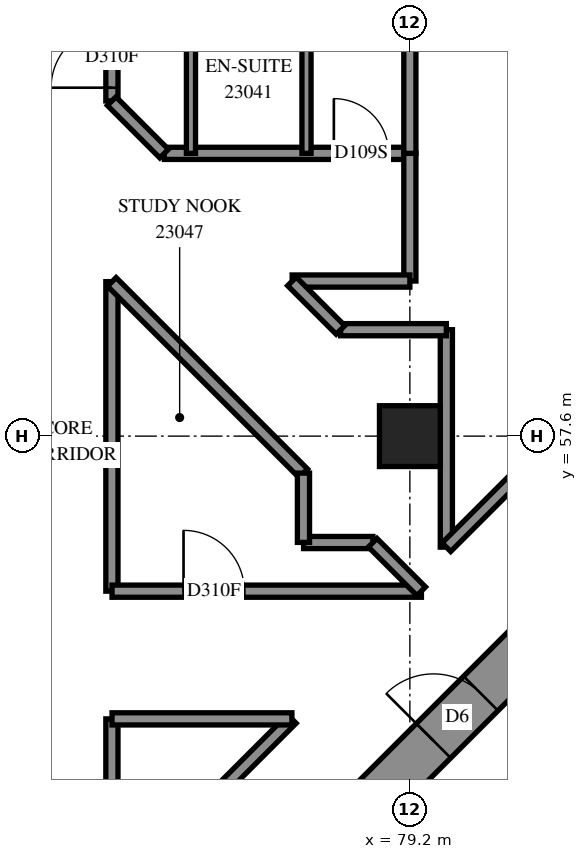
"""IFC4 building model, lengths in metres.
Left out: names, types, materials, properties, quantities, classifications, styles, units other than length and angle.
Written with IfcOpenShell. Run it as: python <this file> out.ifc"""

import sys

from ifc_helpers import new_model, si_unit, direction, frame, frame_2d, origin, origin_2d, place, context, subcontext, project, spatial, rectangle, extrude, element, fill, save


model = new_model("IFC4")
c1 = context("Model", 3, precision=1e-05, world=origin(), true_north=direction((0.0, 1.0)))
c2 = subcontext(c1, "Body", "Model", "MODEL_VIEW")
j1 = project(units=[si_unit("LENGTHUNIT", "METRE"), si_unit("PLANEANGLEUNIT", "RADIAN")], contexts=[c1])
p1 = place(None, origin())
s1 = spatial("IfcSite", under=j1, at=p1, CompositionType="ELEMENT")
p2 = place(p1, origin())
s2 = spatial("IfcBuilding", under=s1, at=p2, CompositionType="ELEMENT")
p3 = place(p2, frame((0.0, 0.0, 88.0)))
s3 = spatial("IfcBuildingStorey", under=s2, at=p3, CompositionType="ELEMENT", Elevation=88.0)
p4 = place(p3, frame((79.2, 57.6, 0.0), z_axis=(0.0, 0.0, 1.0), x_axis=(1.0, 0.0, 0.0)))
e1 = element("IfcColumn", 1, at=p4, inside=s3, PredefinedType="COLUMN", context=c2, shape_type="SweptSolid", body=[
    extrude(rectangle(XDim=1.0, YDim=1.0, at=origin_2d()), origin(), (0.0, 0.0, 1.0), 3.1),
])
p5 = place(p3, frame((76.372, 49.373, -0.3), z_axis=(0.0, 0.0, 1.0), x_axis=(0.7071067812, 0.7071067812, 0.0)))
e2 = element("IfcWall", 2, at=p5, inside=s3, PredefinedType="SHEAR", context=c2, shape_type="SweptSolid", body=[
    extrude(rectangle(XDim=14.4, YDim=0.8, at=frame_2d((7.2, 0.0))), origin(), (0.0, 0.0, 1.0), 2.7),
])
p6 = place(p5, frame((4.55, 0.0, 0.3)))
e3 = element("IfcOpeningElement", 3, at=p6, cuts=e2, PredefinedType="OPENING", context=c2, shape_type="SweptSolid", body=[
    extrude(rectangle(XDim=1.1, YDim=2.1, at=frame_2d((0.55, 1.05))), frame((0.0, 0.41, 0.0), z_axis=(0.0, -1.0, 0.0), x_axis=(1.0, 0.0, 0.0)), (0.0, 0.0, 1.0), 0.82),
])
p7 = place(p5, frame((11.35, 0.0, 0.3)))
e4 = element("IfcOpeningElement", 4, at=p7, cuts=e2, PredefinedType="OPENING", context=c2, shape_type="SweptSolid", body=[
    extrude(rectangle(XDim=1.1, YDim=2.1, at=frame_2d((0.55, 1.05))), frame((0.0, 0.41, 0.0), z_axis=(0.0, -1.0, 0.0), x_axis=(1.0, 0.0, 0.0)), (0.0, 0.0, 1.0), 0.82),
])
p8 = place(p3, frame((74.3, 55.05, 0.0), z_axis=(0.0, 0.0, 1.0), x_axis=(0.0, 1.0, 0.0)))
e5 = element("IfcWall", 5, at=p8, inside=s3, PredefinedType="PARTITIONING", context=c2, shape_type="SweptSolid", body=[
    extrude(rectangle(XDim=5.09, YDim=0.2, at=frame_2d((2.545, 0.0))), origin(), (0.0, 0.0, 1.0), 3.1),
])
p9 = place(p3, frame((74.302, 55.05, 0.0), z_axis=(0.0, 0.0, 1.0), x_axis=(1.0, 0.0, 0.0)))
e6 = element("IfcWall", 6, at=p9, inside=s3, PredefinedType="PARTITIONING", context=c2, shape_type="SweptSolid", body=[
    extrude(rectangle(XDim=5.088, YDim=0.2, at=frame_2d((2.544, 0.0))), origin(), (0.0, 0.0, 1.0), 3.1),
])
p10 = place(p9, frame((1.176, 0.0, 0.0)))
e7 = element("IfcOpeningElement", 7, at=p10, cuts=e6, PredefinedType="OPENING", context=c2, shape_type="SweptSolid", body=[
    extrude(rectangle(XDim=1.0, YDim=2.1, at=frame_2d((0.5, 1.05))), frame((0.0, 0.11, 0.0), z_axis=(0.0, -1.0, 0.0), x_axis=(1.0, 0.0, 0.0)), (0.0, 0.0, 1.0), 0.22),
])
p11 = place(p3, frame((74.299, 60.137, 0.0), z_axis=(0.0, 0.0, 1.0), x_axis=(0.7071067812, -0.7071067812, 0.0)))
e8 = element("IfcWall", 8, at=p11, inside=s3, PredefinedType="PARTITIONING", context=c2, shape_type="SweptSolid", body=[
    extrude(rectangle(XDim=4.452, YDim=0.2, at=frame_2d((2.226, 0.0))), origin(), (0.0, 0.0, 1.0), 3.1),
])
p12 = place(p3, frame((74.301, 49.991, 0.0), z_axis=(0.0, 0.0, 1.0), x_axis=(0.7071067812, 0.7071067812, 0.0)))
e9 = element("IfcWall", 9, at=p12, inside=s3, PredefinedType="PARTITIONING", context=c2, shape_type="SweptSolid", body=[
    extrude(rectangle(XDim=4.183, YDim=0.2, at=frame_2d((2.092, 0.0))), origin(), (0.0, 0.0, 1.0), 3.1),
])
p13 = place(p3, frame((75.162, 62.25, 0.0), z_axis=(0.0, 0.0, 1.0), x_axis=(1.0, 0.0, 0.0)))
e10 = element("IfcWall", 10, at=p13, inside=s3, PredefinedType="PARTITIONING", context=c2, shape_type="SweptSolid", body=[
    extrude(rectangle(XDim=4.038, YDim=0.2, at=frame_2d((2.019, 0.0))), origin(), (0.0, 0.0, 1.0), 3.1),
])
p14 = place(p13, frame((2.788, 0.0, 0.0)))
e11 = element("IfcOpeningElement", 11, at=p14, cuts=e10, PredefinedType="OPENING", context=c2, shape_type="SweptSolid", body=[
    extrude(rectangle(XDim=0.9, YDim=2.1, at=frame_2d((0.45, 1.05))), frame((0.0, 0.11, 0.0), z_axis=(0.0, -1.0, 0.0), x_axis=(1.0, 0.0, 0.0)), (0.0, 0.0, 1.0), 0.22),
])
p15 = place(p3, frame((74.3, 63.112, 0.0), z_axis=(0.0, 0.0, 1.0), x_axis=(0.0, 1.0, 0.0)))
e12 = element("IfcWall", 12, at=p15, inside=s3, PredefinedType="PARTITIONING", context=c2, shape_type="SweptSolid", body=[
    extrude(rectangle(XDim=3.988, YDim=0.2, at=frame_2d((1.994, 0.0))), origin(), (0.0, 0.0, 1.0), 3.1),
])
p16 = place(p15, frame((0.217, 0.0, 0.0)))
e13 = element("IfcOpeningElement", 13, at=p16, cuts=e12, PredefinedType="OPENING", context=c2, shape_type="SweptSolid", body=[
    extrude(rectangle(XDim=1.0, YDim=2.1, at=frame_2d((0.5, 1.05))), frame((0.0, 0.11, 0.0), z_axis=(0.0, -1.0, 0.0), x_axis=(1.0, 0.0, 0.0)), (0.0, 0.0, 1.0), 0.22),
])
p17 = place(p3, frame((79.8, 55.774, 0.0), z_axis=(0.0, 0.0, 1.0), x_axis=(0.0, 1.0, 0.0)))
e14 = element("IfcWall", 14, at=p17, inside=s3, PredefinedType="PARTITIONING", context=c2, shape_type="SweptSolid", body=[
    extrude(rectangle(XDim=3.576, YDim=0.2, at=frame_2d((1.788, 0.0))), origin(), (0.0, 0.0, 1.0), 3.1),
])
p18 = place(p3, frame((74.3, 49.99, 0.0), z_axis=(0.0, 0.0, 1.0), x_axis=(0.0, 1.0, 0.0)))
e15 = element("IfcWall", 15, at=p18, inside=s3, PredefinedType="PARTITIONING", context=c2, shape_type="SweptSolid", body=[
    extrude(rectangle(XDim=2.96, YDim=0.2, at=frame_2d((1.48, 0.0))), origin(), (0.0, 0.0, 1.0), 3.1),
])
p19 = place(p3, frame((74.302, 52.95, 0.0), z_axis=(0.0, 0.0, 1.0), x_axis=(1.0, 0.0, 0.0)))
e16 = element("IfcWall", 16, at=p19, inside=s3, PredefinedType="PARTITIONING", context=c2, shape_type="SweptSolid", body=[
    extrude(rectangle(XDim=2.958, YDim=0.2, at=frame_2d((1.479, 0.0))), origin(), (0.0, 0.0, 1.0), 3.1),
])
for number, where, z_axis, x_axis in (
    (17, (75.6, 62.25, 0.0), (0.0, 0.0, 1.0), (0.0, 1.0, 0.0)),
    (18, (77.5, 62.25, 0.0), (0.0, 0.0, 1.0), (0.0, 1.0, 0.0)),
):
    element("IfcWall", number, at=place(p3, frame(where, z_axis=z_axis, x_axis=x_axis)), inside=s3, PredefinedType="PARTITIONING", context=c2, shape_type="SweptSolid", body=[
        extrude(rectangle(XDim=2.4, YDim=0.15, at=frame_2d((1.2, 0.0))), origin(), (0.0, 0.0, 1.0), 3.1),
    ])
p20 = place(p3, frame((79.2, 60.15, 0.0), z_axis=(0.0, 0.0, 1.0), x_axis=(0.0, 1.0, 0.0)))
e19 = element("IfcWall", 19, at=p20, inside=s3, PredefinedType="PARTITIONING", context=c2, shape_type="SweptSolid", body=[
    extrude(rectangle(XDim=2.1, YDim=0.2, at=frame_2d((1.05, 0.0))), origin(), (0.0, 0.0, 1.0), 3.1),
])
p21 = place(p3, frame((79.2, 62.25, 0.0), z_axis=(0.0, 0.0, 1.0), x_axis=(0.0, 1.0, 0.0)))
e20 = element("IfcWall", 20, at=p21, inside=s3, PredefinedType="PARTITIONING", context=c2, shape_type="SweptSolid", body=[
    extrude(rectangle(XDim=2.05, YDim=0.2, at=frame_2d((1.025, 0.0))), origin(), (0.0, 0.0, 1.0), 3.1),
])
p22 = place(p3, frame((77.264, 60.15, 0.0), z_axis=(0.0, 0.0, 1.0), x_axis=(1.0, 0.0, 0.0)))
e21 = element("IfcWall", 21, at=p22, inside=s3, PredefinedType="PARTITIONING", context=c2, shape_type="SweptSolid", body=[
    extrude(rectangle(XDim=1.936, YDim=0.2, at=frame_2d((0.968, 0.0))), origin(), (0.0, 0.0, 1.0), 3.1),
])
p23 = place(p3, frame((78.062, 59.35, 0.0), z_axis=(0.0, 0.0, 1.0), x_axis=(1.0, 0.0, 0.0)))
e22 = element("IfcWall", 22, at=p23, inside=s3, PredefinedType="PARTITIONING", context=c2, shape_type="SweptSolid", body=[
    extrude(rectangle(XDim=1.738, YDim=0.2, at=frame_2d((0.869, 0.0))), origin(), (0.0, 0.0, 1.0), 3.1),
])
p24 = place(p3, frame((79.801, 55.773, 0.0), z_axis=(0.0, 0.0, 1.0), x_axis=(0.7071067812, 0.7071067812, 0.0)))
e23 = element("IfcWall", 23, at=p24, inside=s3, PredefinedType="PARTITIONING", context=c2, shape_type="SweptSolid", body=[
    extrude(rectangle(XDim=1.623, YDim=0.2, at=frame_2d((0.812, 0.0))), origin(), (0.0, 0.0, 1.0), 3.1),
])
p25 = place(p3, frame((74.296, 63.108, 0.0), z_axis=(0.0, 0.0, 1.0), x_axis=(0.7071067812, -0.7071067812, 0.0)))
e24 = element("IfcWall", 24, at=p25, inside=s3, PredefinedType="PARTITIONING", context=c2, shape_type="SweptSolid", body=[
    extrude(rectangle(XDim=1.219, YDim=0.2, at=frame_2d((0.61, 0.0))), origin(), (0.0, 0.0, 1.0), 3.1),
])
for number, where, z_axis, x_axis in (
    (25, (77.452, 55.85, 0.0), (0.0, 0.0, 1.0), (1.0, 0.0, 0.0)),
    (26, (77.45, 55.852, 0.0), (0.0, 0.0, 1.0), (0.0, 1.0, 0.0)),
):
    element("IfcWall", number, at=place(p3, frame(where, z_axis=z_axis, x_axis=x_axis)), inside=s3, PredefinedType="PARTITIONING", context=c2, shape_type="SweptSolid", body=[
        extrude(rectangle(XDim=1.14, YDim=0.2, at=frame_2d((0.57, 0.0))), origin(), (0.0, 0.0, 1.0), 3.1),
    ])
for number, where, z_axis, x_axis in (
    (27, (77.26, 60.145, 0.0), (0.0, 0.0, 1.0), (0.707, -0.707, 0.0)),
    (28, (78.589, 55.847, 0.0), (0.0, 0.0, 1.0), (0.707, -0.707, 0.0)),
):
    element("IfcWall", number, at=place(p3, frame(where, z_axis=z_axis, x_axis=x_axis)), inside=s3, PredefinedType="PARTITIONING", context=c2, shape_type="SweptSolid", body=[
        extrude(rectangle(XDim=1.129, YDim=0.2, at=frame_2d((0.564, 0.0))), origin(), (0.0, 0.0, 1.0), 3.1),
    ])
p26 = place(p6, origin())
e29 = element("IfcDoor", 29, at=p26, inside=s3, OperationType="DOUBLE_DOOR_SINGLE_SWING", PredefinedType="DOOR", context=c2, shape_type="SweptSolid", body=[
    extrude(rectangle(XDim=1.1, YDim=2.1, at=frame_2d((0.55, 1.05))), frame((0.0, 0.025, 0.0), z_axis=(0.0, -1.0, 0.0), x_axis=(1.0, 0.0, 0.0)), (0.0, 0.0, 1.0), 0.05),
])
fill(e3, e29)
p27 = place(p16, origin())
e30 = element("IfcDoor", 30, at=p27, inside=s3, OperationType="SINGLE_SWING_RIGHT", PredefinedType="DOOR", context=c2, shape_type="SweptSolid", body=[
    extrude(rectangle(XDim=1.0, YDim=2.1, at=frame_2d((0.5, 1.05))), frame((0.0, 0.025, 0.0), z_axis=(0.0, -1.0, 0.0), x_axis=(1.0, 0.0, 0.0)), (0.0, 0.0, 1.0), 0.05),
])
fill(e13, e30)
p28 = place(p14, origin())
e31 = element("IfcDoor", 31, at=p28, inside=s3, OperationType="SINGLE_SWING_LEFT", PredefinedType="DOOR", context=c2, shape_type="SweptSolid", body=[
    extrude(rectangle(XDim=0.9, YDim=2.1, at=frame_2d((0.45, 1.05))), frame((0.0, 0.025, 0.0), z_axis=(0.0, -1.0, 0.0), x_axis=(1.0, 0.0, 0.0)), (0.0, 0.0, 1.0), 0.05),
])
fill(e11, e31)
p29 = place(p10, origin())
e32 = element("IfcDoor", 32, at=p29, inside=s3, OperationType="SINGLE_SWING_LEFT", PredefinedType="DOOR", context=c2, shape_type="SweptSolid", body=[
    extrude(rectangle(XDim=1.0, YDim=2.1, at=frame_2d((0.5, 1.05))), frame((0.0, 0.025, 0.0), z_axis=(0.0, -1.0, 0.0), x_axis=(1.0, 0.0, 0.0)), (0.0, 0.0, 1.0), 0.05),
])
fill(e7, e32)
save(model, sys.argv[1])
